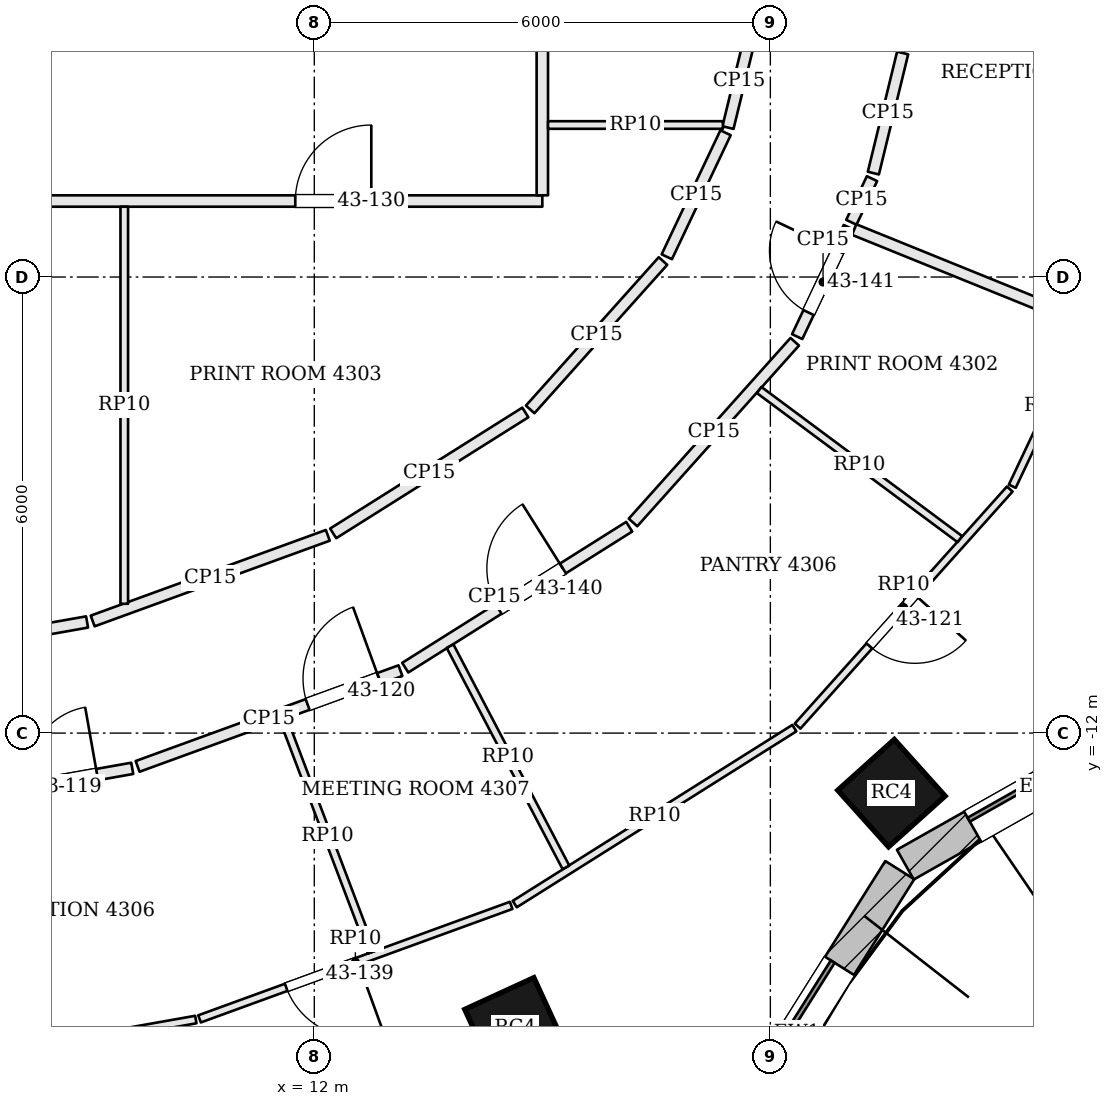
"""IFC4 building model, lengths in metres.
Left out: names, types, materials, properties, quantities, classifications, styles, units other than length and angle.
Written with IfcOpenShell. Run it as: python <this file> out.ifc"""

import sys

from ifc_helpers import new_model, si_unit, direction, frame, frame_2d, origin, origin_2d, place, context, subcontext, project, spatial, rectangle, extrude, element, fill, save


model = new_model("IFC4")
c1 = context("Model", 3, precision=1e-05, world=origin(), true_north=direction((0.0, 1.0)))
c2 = subcontext(c1, "Body", "Model", "MODEL_VIEW")
j1 = project(units=[si_unit("LENGTHUNIT", "METRE"), si_unit("PLANEANGLEUNIT", "RADIAN")], contexts=[c1])
p1 = place(None, origin())
s1 = spatial("IfcSite", under=j1, at=p1, CompositionType="ELEMENT")
p2 = place(p1, origin())
s2 = spatial("IfcBuilding", under=s1, at=p2, CompositionType="ELEMENT")
p3 = place(p2, frame((0.0, 0.0, 177.9)))
s3 = spatial("IfcBuildingStorey", under=s2, at=p3, CompositionType="ELEMENT", Elevation=177.9)
for number, where, z_axis, x_axis in (
    (1, (14.643, -15.881, 0.0), (0.0, 0.0, 1.0), (0.909, 0.417, 0.0)),
    (2, (19.593, -12.79, 0.0), (0.0, 0.0, 1.0), (0.744, 0.668, 0.0)),
):
    element("IfcColumn", number, at=place(p3, frame(where, z_axis=z_axis, x_axis=x_axis)), inside=s3, PredefinedType="COLUMN", context=c2, shape_type="SweptSolid", body=[
        extrude(rectangle(XDim=1.0, YDim=1.0, at=origin_2d()), origin(), (0.0, 0.0, 1.0), 3.9),
    ])
p4 = place(p3, frame((16.998, -18.099, 0.0), z_axis=(0.0, 0.0, 1.0), x_axis=(0.532745661304, 0.846275404559, 0.0)))
e3 = element("IfcWall", 3, at=p4, inside=s3, PredefinedType="SOLIDWALL", context=c2, shape_type="SweptSolid", body=[
    extrude(rectangle(XDim=5.076, YDim=0.45, at=frame_2d((2.538, 0.0))), origin(), (0.0, 0.0, 1.0), 3.7),
])
p5 = place(p4, frame((1.488, 0.0, 0.9)))
e4 = element("IfcOpeningElement", 4, at=p5, cuts=e3, PredefinedType="OPENING", context=c2, shape_type="SweptSolid", body=[
    extrude(rectangle(XDim=2.1, YDim=2.3, at=frame_2d((1.05, 1.15))), frame((0.0, 0.235, 0.0), z_axis=(0.0, -1.0, 0.0), x_axis=(1.0, 0.0, 0.0)), (0.0, 0.0, 1.0), 0.47),
])
p6 = place(p3, frame((19.776, -13.731, 0.0), z_axis=(0.0, 0.0, 1.0), x_axis=(0.870610133829, 0.491973571318, 0.0)))
e5 = element("IfcWall", 5, at=p6, inside=s3, PredefinedType="SOLIDWALL", context=c2, shape_type="SweptSolid", body=[
    extrude(rectangle(XDim=4.134, YDim=0.45, at=frame_2d((2.067, 0.0))), origin(), (0.0, 0.0, 1.0), 3.7),
])
p7 = place(p6, frame((1.017, 0.0, 0.9)))
e6 = element("IfcOpeningElement", 6, at=p7, cuts=e5, PredefinedType="OPENING", context=c2, shape_type="SweptSolid", body=[
    extrude(rectangle(XDim=2.1, YDim=2.3, at=frame_2d((1.05, 1.15))), frame((0.0, 0.235, 0.0), z_axis=(0.0, -1.0, 0.0), x_axis=(1.0, 0.0, 0.0)), (0.0, 0.0, 1.0), 0.47),
])
p8 = place(p3, frame((5.992, -13.104, 0.0), z_axis=(0.0, 0.0, 1.0), x_axis=(0.98463249319, 0.174639209096, 0.0)))
e7 = element("IfcWall", 7, at=p8, inside=s3, PredefinedType="PARTITIONING", context=c2, shape_type="SweptSolid", body=[
    extrude(rectangle(XDim=3.67, YDim=0.15, at=frame_2d((1.835, 0.0))), origin(), (0.0, 0.0, 1.0), 3.084),
])
p9 = place(p8, frame((1.4, 0.0, 0.0)))
e8 = element("IfcOpeningElement", 8, at=p9, cuts=e7, PredefinedType="OPENING", context=c2, shape_type="SweptSolid", body=[
    extrude(rectangle(XDim=1.8, YDim=2.1, at=frame_2d((0.9, 1.05))), frame((0.0, 0.085, 0.0), z_axis=(0.0, -1.0, 0.0), x_axis=(1.0, 0.0, 0.0)), (0.0, 0.0, 1.0), 0.17),
])
p10 = place(p3, frame((9.676, -12.438, 0.0), z_axis=(0.0, 0.0, 1.0), x_axis=(0.939640289748, 0.342163887461, 0.0)))
e9 = element("IfcWall", 9, at=p10, inside=s3, PredefinedType="PARTITIONING", context=c2, shape_type="SweptSolid", body=[
    extrude(rectangle(XDim=3.68, YDim=0.15, at=frame_2d((1.84, 0.0))), origin(), (0.0, 0.0, 1.0), 3.084),
])
p11 = place(p10, frame((2.38, 0.0, 0.0)))
e10 = element("IfcOpeningElement", 10, at=p11, cuts=e9, PredefinedType="OPENING", context=c2, shape_type="SweptSolid", body=[
    extrude(rectangle(XDim=1.0, YDim=2.4, at=frame_2d((0.5, 1.2))), frame((0.0, 0.085, 0.0), z_axis=(0.0, -1.0, 0.0), x_axis=(1.0, 0.0, 0.0)), (0.0, 0.0, 1.0), 0.17),
])
p12 = place(p3, frame((13.197, -11.139, 0.0), z_axis=(0.0, 0.0, 1.0), x_axis=(0.846390903833, 0.532562144644, 0.0)))
e11 = element("IfcWall", 11, at=p12, inside=s3, PredefinedType="PARTITIONING", context=c2, shape_type="SweptSolid", body=[
    extrude(rectangle(XDim=3.481, YDim=0.15, at=frame_2d((1.741, 0.0))), origin(), (0.0, 0.0, 1.0), 3.084),
])
p13 = place(p12, frame((1.45, 0.0, 0.0)))
e12 = element("IfcOpeningElement", 12, at=p13, cuts=e11, PredefinedType="OPENING", context=c2, shape_type="SweptSolid", body=[
    extrude(rectangle(XDim=1.0, YDim=2.1, at=frame_2d((0.5, 1.05))), frame((0.0, 0.085, 0.0), z_axis=(0.0, -1.0, 0.0), x_axis=(1.0, 0.0, 0.0)), (0.0, 0.0, 1.0), 0.17),
])
p14 = place(p3, frame((16.193, -9.229, 0.0), z_axis=(0.0, 0.0, 1.0), x_axis=(0.666882089048, 0.745163256815, 0.0)))
e13 = element("IfcWall", 13, at=p14, inside=s3, PredefinedType="PARTITIONING", context=c2, shape_type="SweptSolid", body=[
    extrude(rectangle(XDim=3.19, YDim=0.15, at=frame_2d((1.595, 0.0))), origin(), (0.0, 0.0, 1.0), 3.084),
])
p15 = place(p3, frame((18.353, -6.784, 0.0), z_axis=(0.0, 0.0, 1.0), x_axis=(0.428125964575, 0.90371907054, 0.0)))
e14 = element("IfcWall", 14, at=p15, inside=s3, PredefinedType="PARTITIONING", context=c2, shape_type="SweptSolid", body=[
    extrude(rectangle(XDim=1.589, YDim=0.15, at=frame_2d((0.795, 0.0))), origin(), (0.0, 0.0, 1.0), 3.084),
])
p16 = place(p15, frame((0.35, 0.0, 0.0)))
e15 = element("IfcOpeningElement", 15, at=p16, cuts=e14, PredefinedType="OPENING", context=c2, shape_type="SweptSolid", body=[
    extrude(rectangle(XDim=0.9, YDim=2.1, at=frame_2d((0.45, 1.05))), frame((0.0, 0.085, 0.0), z_axis=(0.0, -1.0, 0.0), x_axis=(1.0, 0.0, 0.0)), (0.0, 0.0, 1.0), 0.17),
])
p17 = place(p3, frame((27.593, -8.816, 0.0), z_axis=(0.0, 0.0, 1.0), x_axis=(-0.9267854071, 0.375591279433, 0.0)))
e16 = element("IfcWall", 16, at=p17, inside=s3, PredefinedType="PARTITIONING", context=c2, shape_type="SweptSolid", body=[
    extrude(rectangle(XDim=9.161, YDim=0.15, at=frame_2d((4.58, 0.0))), origin(), (0.0, 0.0, 1.0), 3.234),
])
p18 = place(p3, frame((19.065, -5.28, 0.0), z_axis=(0.0, 0.0, 1.0), x_axis=(0.428202003813, 0.903683043954, 0.0)))
e17 = element("IfcWall", 17, at=p18, inside=s3, PredefinedType="PARTITIONING", context=c2, shape_type="SweptSolid", body=[
    extrude(rectangle(XDim=0.635, YDim=0.15, at=frame_2d((0.318, 0.0))), origin(), (0.0, 0.0, 1.0), 3.084),
])
p19 = place(p3, frame((19.355, -4.633, 0.0), z_axis=(0.0, 0.0, 1.0), x_axis=(0.236703930685, 0.971581828359, 0.0)))
e18 = element("IfcWall", 18, at=p19, inside=s3, PredefinedType="PARTITIONING", context=c2, shape_type="SweptSolid", body=[
    extrude(rectangle(XDim=1.626, YDim=0.15, at=frame_2d((0.813, 0.0))), origin(), (0.0, 0.0, 1.0), 3.084),
])
p20 = place(p3, frame((17.739, -2.818, 0.0), z_axis=(0.0, 0.0, 1.0), x_axis=(-0.236884307907, -0.971537865792, 0.0)))
e19 = element("IfcWall", 19, at=p20, inside=s3, PredefinedType="PARTITIONING", context=c2, shape_type="SweptSolid", body=[
    extrude(rectangle(XDim=1.251, YDim=0.15, at=frame_2d((0.625, 0.0))), origin(), (0.0, 0.0, 1.0), 3.084),
])
p21 = place(p3, frame((17.41, -4.102, 0.0), z_axis=(0.0, 0.0, 1.0), x_axis=(-0.428074720318, -0.903743345107, 0.0)))
e20 = element("IfcWall", 20, at=p21, inside=s3, PredefinedType="PARTITIONING", context=c2, shape_type="SweptSolid", body=[
    extrude(rectangle(XDim=1.806, YDim=0.15, at=frame_2d((0.903, 0.0))), origin(), (0.0, 0.0, 1.0), 3.084),
])
p22 = place(p3, frame((16.587, -5.789, 0.0), z_axis=(0.0, 0.0, 1.0), x_axis=(-0.666887460656, -0.745158449472, 0.0)))
e21 = element("IfcWall", 21, at=p22, inside=s3, PredefinedType="PARTITIONING", context=c2, shape_type="SweptSolid", body=[
    extrude(rectangle(XDim=2.62, YDim=0.15, at=frame_2d((1.31, 0.0))), origin(), (0.0, 0.0, 1.0), 3.084),
])
p23 = place(p3, frame((14.777, -7.781, 0.0), z_axis=(0.0, 0.0, 1.0), x_axis=(-0.846359741043, -0.532611667862, 0.0)))
e22 = element("IfcWall", 22, at=p23, inside=s3, PredefinedType="PARTITIONING", context=c2, shape_type="SweptSolid", body=[
    extrude(rectangle(XDim=2.987, YDim=0.15, at=frame_2d((1.494, 0.0))), origin(), (0.0, 0.0, 1.0), 3.084),
])
p24 = place(p3, frame((12.178, -9.398, 0.0), z_axis=(0.0, 0.0, 1.0), x_axis=(-0.939609240084, -0.342249143093, 0.0)))
e23 = element("IfcWall", 23, at=p24, inside=s3, PredefinedType="PARTITIONING", context=c2, shape_type="SweptSolid", body=[
    extrude(rectangle(XDim=3.292, YDim=0.15, at=frame_2d((1.646, 0.0))), origin(), (0.0, 0.0, 1.0), 3.084),
])
p25 = place(p3, frame((9.01, -10.538, 0.0), z_axis=(0.0, 0.0, 1.0), x_axis=(-0.984645638575, -0.174565077936, 0.0)))
e24 = element("IfcWall", 24, at=p25, inside=s3, PredefinedType="PARTITIONING", context=c2, shape_type="SweptSolid", body=[
    extrude(rectangle(XDim=4.358, YDim=0.15, at=frame_2d((2.179, 0.0))), origin(), (0.0, 0.0, 1.0), 3.084),
])
p26 = place(p3, frame((-14.925, -5.0, 0.0), z_axis=(0.0, 0.0, 1.0), x_axis=(1.0, 0.0, 0.0)))
e25 = element("IfcWall", 25, at=p26, inside=s3, PredefinedType="PARTITIONING", context=c2, shape_type="SweptSolid", body=[
    extrude(rectangle(XDim=29.925, YDim=0.15, at=frame_2d((14.962, 0.0))), origin(), (0.0, 0.0, 1.0), 3.084),
])
p27 = place(p26, frame((2.175, 0.0, 0.0)))
e26 = element("IfcOpeningElement", 26, at=p27, cuts=e25, PredefinedType="OPENING", context=c2, shape_type="SweptSolid", body=[
    extrude(rectangle(XDim=1.0, YDim=2.1, at=frame_2d((0.5, 1.05))), frame((0.0, 0.085, 0.0), z_axis=(0.0, -1.0, 0.0), x_axis=(1.0, 0.0, 0.0)), (0.0, 0.0, 1.0), 0.17),
])
p28 = place(p26, frame((14.025, 0.0, 0.0)))
e27 = element("IfcOpeningElement", 27, at=p28, cuts=e25, PredefinedType="OPENING", context=c2, shape_type="SweptSolid", body=[
    extrude(rectangle(XDim=1.8, YDim=2.1, at=frame_2d((0.9, 1.05))), frame((0.0, 0.085, 0.0), z_axis=(0.0, -1.0, 0.0), x_axis=(1.0, 0.0, 0.0)), (0.0, 0.0, 1.0), 0.17),
])
p29 = place(p26, frame((26.675, 0.0, 0.0)))
e28 = element("IfcOpeningElement", 28, at=p29, cuts=e25, PredefinedType="OPENING", context=c2, shape_type="SweptSolid", body=[
    extrude(rectangle(XDim=1.0, YDim=2.1, at=frame_2d((0.5, 1.05))), frame((0.0, 0.085, 0.0), z_axis=(0.0, -1.0, 0.0), x_axis=(1.0, 0.0, 0.0)), (0.0, 0.0, 1.0), 0.17),
])
p30 = place(p3, frame((15.0, -4.925, 0.0), z_axis=(0.0, 0.0, 1.0), x_axis=(0.0, 1.0, 0.0)))
e29 = element("IfcWall", 29, at=p30, inside=s3, PredefinedType="PARTITIONING", context=c2, shape_type="SweptSolid", body=[
    extrude(rectangle(XDim=12.583, YDim=0.15, at=frame_2d((6.292, 0.0))), origin(), (0.0, 0.0, 1.0), 3.084),
])
p31 = place(p30, frame((6.441, 0.0, 0.0)))
e30 = element("IfcOpeningElement", 30, at=p31, cuts=e29, PredefinedType="OPENING", context=c2, shape_type="SweptSolid", body=[
    extrude(rectangle(XDim=0.7, YDim=2.1, at=frame_2d((0.35, 1.05))), frame((0.0, 0.085, 0.0), z_axis=(0.0, -1.0, 0.0), x_axis=(1.0, 0.0, 0.0)), (0.0, 0.0, 1.0), 0.17),
])
p32 = place(p3, frame((22.181, -6.645, 0.0), z_axis=(0.0, 0.0, 1.0), x_axis=(-0.428144841987, -0.903710127353, 0.0)))
e31 = element("IfcWall", 31, at=p32, inside=s3, PredefinedType="PARTITIONING", context=c2, shape_type="SweptSolid", body=[
    extrude(rectangle(XDim=2.332, YDim=0.1, at=frame_2d((1.166, 0.0))), origin(), (0.0, 0.0, 1.0), 3.084),
])
p33 = place(p3, frame((21.149, -8.789, 0.0), z_axis=(0.0, 0.0, 1.0), x_axis=(-0.666915902537, -0.745132994132, 0.0)))
e32 = element("IfcWall", 32, at=p33, inside=s3, PredefinedType="PARTITIONING", context=c2, shape_type="SweptSolid", body=[
    extrude(rectangle(XDim=4.186, YDim=0.1, at=frame_2d((2.093, 0.0))), origin(), (0.0, 0.0, 1.0), 3.084),
])
p34 = place(p33, frame((1.869, 0.0, 0.0)))
e33 = element("IfcOpeningElement", 33, at=p34, cuts=e32, PredefinedType="OPENING", context=c2, shape_type="SweptSolid", body=[
    extrude(rectangle(XDim=0.9, YDim=2.1, at=frame_2d((0.45, 1.05))), frame((0.0, 0.06, 0.0), z_axis=(0.0, -1.0, 0.0), x_axis=(1.0, 0.0, 0.0)), (0.0, 0.0, 1.0), 0.12),
])
p35 = place(p3, frame((18.316, -11.935, 0.0), z_axis=(0.0, 0.0, 1.0), x_axis=(-0.84637539713, -0.532586788358, 0.0)))
e34 = element("IfcWall", 34, at=p35, inside=s3, PredefinedType="PARTITIONING", context=c2, shape_type="SweptSolid", body=[
    extrude(rectangle(XDim=4.346, YDim=0.1, at=frame_2d((2.173, 0.0))), origin(), (0.0, 0.0, 1.0), 3.084),
])
p36 = place(p3, frame((14.59, -14.267, 0.0), z_axis=(0.0, 0.0, 1.0), x_axis=(-0.939623405418, -0.342210251148, 0.0)))
e35 = element("IfcWall", 35, at=p36, inside=s3, PredefinedType="PARTITIONING", context=c2, shape_type="SweptSolid", body=[
    extrude(rectangle(XDim=4.363, YDim=0.1, at=frame_2d((2.182, 0.0))), origin(), (0.0, 0.0, 1.0), 3.084),
])
p37 = place(p36, frame((2.15, 0.0, 0.0)))
e36 = element("IfcOpeningElement", 36, at=p37, cuts=e35, PredefinedType="OPENING", context=c2, shape_type="SweptSolid", body=[
    extrude(rectangle(XDim=1.0, YDim=2.1, at=frame_2d((0.5, 1.05))), frame((0.0, 0.06, 0.0), z_axis=(0.0, -1.0, 0.0), x_axis=(1.0, 0.0, 0.0)), (0.0, 0.0, 1.0), 0.12),
])
p38 = place(p3, frame((10.441, -15.769, 0.0), z_axis=(0.0, 0.0, 1.0), x_axis=(-0.984637220861, -0.174612551941, 0.0)))
e37 = element("IfcWall", 37, at=p38, inside=s3, PredefinedType="PARTITIONING", context=c2, shape_type="SweptSolid", body=[
    extrude(rectangle(XDim=4.125, YDim=0.1, at=frame_2d((2.062, 0.0))), origin(), (0.0, 0.0, 1.0), 3.084),
])
p39 = place(p3, frame((11.594, -11.819, 0.0), z_axis=(0.0, 0.0, 1.0), x_axis=(0.354584575087, -0.935023945742, 0.0)))
e38 = element("IfcWall", 38, at=p39, inside=s3, PredefinedType="PARTITIONING", context=c2, shape_type="SweptSolid", body=[
    extrude(rectangle(XDim=3.275, YDim=0.1, at=frame_2d((1.638, 0.0))), origin(), (0.0, 0.0, 1.0), 3.084),
])
p40 = place(p3, frame((13.786, -10.856, 0.0), z_axis=(0.0, 0.0, 1.0), x_axis=(0.464015323866, -0.885827172318, 0.0)))
e39 = element("IfcWall", 39, at=p40, inside=s3, PredefinedType="PARTITIONING", context=c2, shape_type="SweptSolid", body=[
    extrude(rectangle(XDim=3.286, YDim=0.1, at=frame_2d((1.643, 0.0))), origin(), (0.0, 0.0, 1.0), 3.084),
])
p41 = place(p3, frame((17.853, -7.487, 0.0), z_axis=(0.0, 0.0, 1.0), x_axis=(0.802681916891, -0.596407361034, 0.0)))
e40 = element("IfcWall", 40, at=p41, inside=s3, PredefinedType="PARTITIONING", context=c2, shape_type="SweptSolid", body=[
    extrude(rectangle(XDim=3.289, YDim=0.1, at=frame_2d((1.645, 0.0))), origin(), (0.0, 0.0, 1.0), 3.084),
])
p42 = place(p3, frame((9.5, -10.299, 0.0), z_axis=(0.0, 0.0, 1.0), x_axis=(0.0, 1.0, 0.0)))
e41 = element("IfcWall", 41, at=p42, inside=s3, PredefinedType="PARTITIONING", context=c2, shape_type="SweptSolid", body=[
    extrude(rectangle(XDim=5.224, YDim=0.1, at=frame_2d((2.612, 0.0))), origin(), (0.0, 0.0, 1.0), 3.084),
])
p43 = place(p3, frame((15.075, -4.0, 0.0), z_axis=(0.0, 0.0, 1.0), x_axis=(1.0, 0.0, 0.0)))
e42 = element("IfcWall", 42, at=p43, inside=s3, PredefinedType="PARTITIONING", context=c2, shape_type="SweptSolid", body=[
    extrude(rectangle(XDim=2.301, YDim=0.1, at=frame_2d((1.15, 0.0))), origin(), (0.0, 0.0, 1.0), 3.084),
])
p44 = place(p5, origin())
e43 = element("IfcWindow", 43, at=p44, inside=s3, PartitioningType="SINGLE_PANEL", PredefinedType="WINDOW", context=c2, shape_type="SweptSolid", body=[
    extrude(rectangle(XDim=2.1, YDim=2.3, at=frame_2d((1.05, 1.15))), frame((0.0, 0.135, 0.0), z_axis=(0.0, -1.0, 0.0), x_axis=(1.0, 0.0, 0.0)), (0.0, 0.0, 1.0), 0.06),
])
fill(e4, e43)
p45 = place(p7, origin())
e44 = element("IfcWindow", 44, at=p45, inside=s3, PartitioningType="SINGLE_PANEL", PredefinedType="WINDOW", context=c2, shape_type="SweptSolid", body=[
    extrude(rectangle(XDim=2.1, YDim=2.3, at=frame_2d((1.05, 1.15))), frame((0.0, 0.135, 0.0), z_axis=(0.0, -1.0, 0.0), x_axis=(1.0, 0.0, 0.0)), (0.0, 0.0, 1.0), 0.06),
])
fill(e6, e44)
p46 = place(p9, origin())
e45 = element("IfcDoor", 45, at=p46, inside=s3, OperationType="DOUBLE_DOOR_SINGLE_SWING", PredefinedType="DOOR", context=c2, shape_type="SweptSolid", body=[
    extrude(rectangle(XDim=1.8, YDim=2.1, at=frame_2d((0.9, 1.05))), frame((0.0, 0.025, 0.0), z_axis=(0.0, -1.0, 0.0), x_axis=(1.0, 0.0, 0.0)), (0.0, 0.0, 1.0), 0.05),
])
fill(e8, e45)
p47 = place(p11, origin())
e46 = element("IfcDoor", 46, at=p47, inside=s3, OperationType="SINGLE_SWING_RIGHT", PredefinedType="DOOR", context=c2, shape_type="SweptSolid", body=[
    extrude(rectangle(XDim=1.0, YDim=2.4, at=frame_2d((0.5, 1.2))), frame((0.0, 0.025, 0.0), z_axis=(0.0, -1.0, 0.0), x_axis=(1.0, 0.0, 0.0)), (0.0, 0.0, 1.0), 0.05),
])
fill(e10, e46)
p48 = place(p34, origin())
e47 = element("IfcDoor", 47, at=p48, inside=s3, OperationType="SINGLE_SWING_LEFT", PredefinedType="DOOR", context=c2, shape_type="SweptSolid", body=[
    extrude(rectangle(XDim=0.9, YDim=2.1, at=frame_2d((0.45, 1.05))), frame((0.0, 0.025, 0.0), z_axis=(0.0, -1.0, 0.0), x_axis=(1.0, 0.0, 0.0)), (0.0, 0.0, 1.0), 0.05),
])
fill(e33, e47)
p49 = place(p29, origin())
e48 = element("IfcDoor", 48, at=p49, inside=s3, OperationType="SINGLE_SWING_RIGHT", PredefinedType="DOOR", context=c2, shape_type="SweptSolid", body=[
    extrude(rectangle(XDim=1.0, YDim=2.1, at=frame_2d((0.5, 1.05))), frame((0.0, 0.025, 0.0), z_axis=(0.0, -1.0, 0.0), x_axis=(1.0, 0.0, 0.0)), (0.0, 0.0, 1.0), 0.05),
])
fill(e28, e48)
p50 = place(p37, origin())
e49 = element("IfcDoor", 49, at=p50, inside=s3, OperationType="SINGLE_SWING_LEFT", PredefinedType="DOOR", context=c2, shape_type="SweptSolid", body=[
    extrude(rectangle(XDim=1.0, YDim=2.1, at=frame_2d((0.5, 1.05))), frame((0.0, 0.025, 0.0), z_axis=(0.0, -1.0, 0.0), x_axis=(1.0, 0.0, 0.0)), (0.0, 0.0, 1.0), 0.05),
])
fill(e36, e49)
p51 = place(p13, origin())
e50 = element("IfcDoor", 50, at=p51, inside=s3, OperationType="SINGLE_SWING_RIGHT", PredefinedType="DOOR", context=c2, shape_type="SweptSolid", body=[
    extrude(rectangle(XDim=1.0, YDim=2.1, at=frame_2d((0.5, 1.05))), frame((0.0, 0.025, 0.0), z_axis=(0.0, -1.0, 0.0), x_axis=(1.0, 0.0, 0.0)), (0.0, 0.0, 1.0), 0.05),
])
fill(e12, e50)
p52 = place(p16, origin())
e51 = element("IfcDoor", 51, at=p52, inside=s3, OperationType="SINGLE_SWING_RIGHT", PredefinedType="DOOR", context=c2, shape_type="SweptSolid", body=[
    extrude(rectangle(XDim=0.9, YDim=2.1, at=frame_2d((0.45, 1.05))), frame((0.0, 0.025, 0.0), z_axis=(0.0, -1.0, 0.0), x_axis=(1.0, 0.0, 0.0)), (0.0, 0.0, 1.0), 0.05),
])
fill(e15, e51)
save(model, sys.argv[1])
